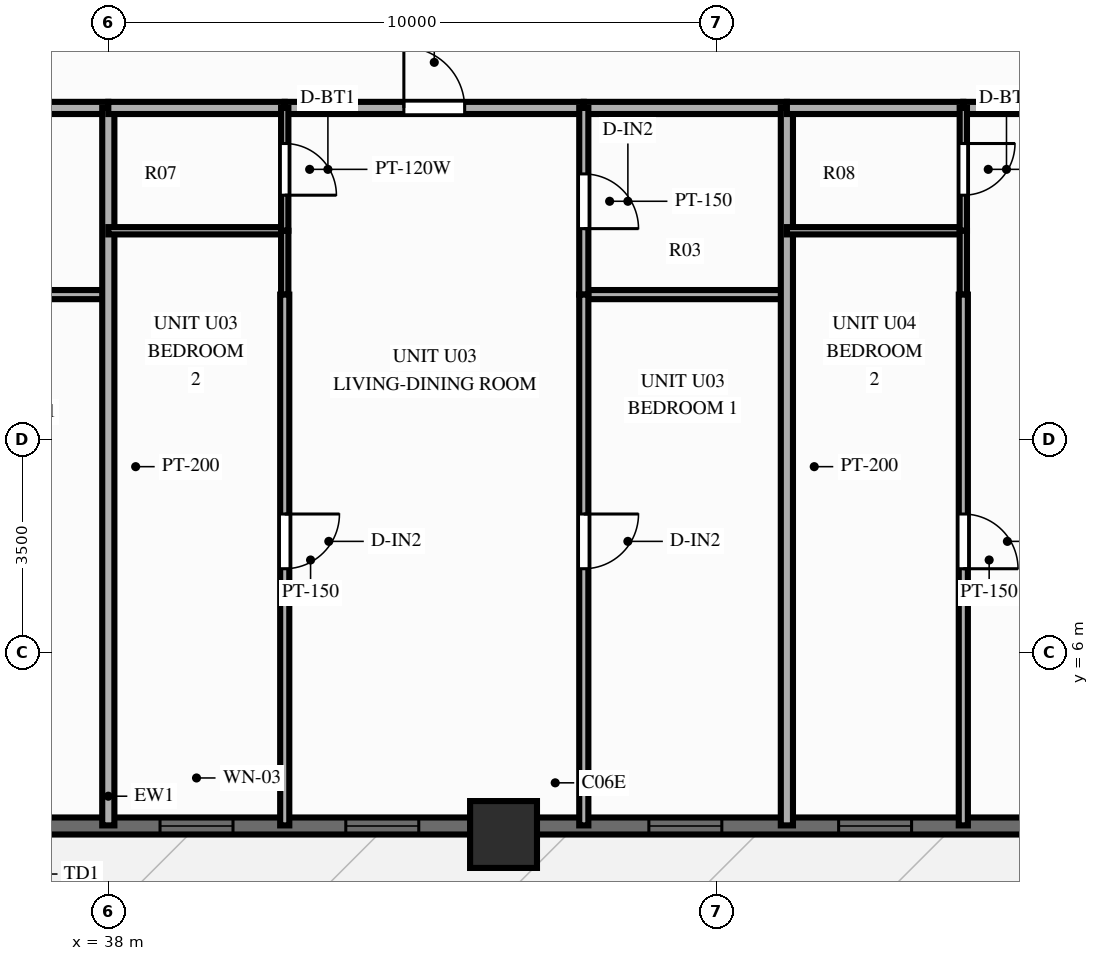
"""IFC4 building model, lengths in metres.
Left out: names, types, materials, properties, quantities, classifications, styles, units other than length and angle.
Written with IfcOpenShell. Run it as: python <this file> out.ifc"""

import sys

from ifc_helpers import new_model, si_unit, direction, frame, frame_2d, origin, origin_2d, place, context, subcontext, project, spatial, rectangle, extrude, source, transform, mapped, element, fill, save


model = new_model("IFC4")
c1 = context("Model", 3, precision=1e-05, world=origin(), true_north=direction((0.0, 1.0)))
c2 = subcontext(c1, "Body", "Model", "MODEL_VIEW")
j1 = project(units=[si_unit("LENGTHUNIT", "METRE"), si_unit("PLANEANGLEUNIT", "RADIAN")], contexts=[c1])
p1 = place(None, origin())
s1 = spatial("IfcSite", under=j1, at=p1, CompositionType="ELEMENT")
p2 = place(p1, origin())
s2 = spatial("IfcBuilding", under=s1, at=p2, CompositionType="ELEMENT")
p3 = place(p2, frame((0.0, 0.0, 43.4)))
s3 = spatial("IfcBuildingStorey", under=s2, at=p3, CompositionType="ELEMENT", Elevation=43.4)
m1 = source(origin(), c2, "Body", "SweptSolid", [
    extrude(rectangle(XDim=1.1, YDim=1.1, at=origin_2d()), origin(), (0.0, 0.0, 1.0), 3.0),
])
p4 = place(p3, frame((44.5, 3.0, 0.0), z_axis=(0.0, 0.0, 1.0), x_axis=(1.0, 0.0, 0.0)))
e1 = element("IfcColumn", 1, at=p4, inside=s3, PredefinedType="COLUMN", context=c2, shape_type="MappedRepresentation", body=[
    mapped(m1, transform((0.0, 0.0, 0.0), scale=1.0)),
])
p5 = place(p3, frame((15.5, 3.14, 0.0), z_axis=(0.0, 0.0, 1.0), x_axis=(1.0, 0.0, 0.0)))
e2 = element("IfcWall", 2, at=p5, inside=s3, PredefinedType="SOLIDWALL", context=c2, shape_type="SweptSolid", body=[
    extrude(rectangle(XDim=45.0, YDim=0.28, at=frame_2d((22.5, 0.0))), origin(), (0.0, 0.0, 1.0), 2.28),
])
p6 = place(p5, frame((1.136, 0.0, 0.25)))
e3 = element("IfcOpeningElement", 3, at=p6, cuts=e2, PredefinedType="OPENING", context=c2, shape_type="SweptSolid", body=[
    extrude(rectangle(XDim=1.2, YDim=1.5, at=frame_2d((0.6, 0.75))), frame((0.0, 0.152, 0.0), z_axis=(0.0, -1.0, 0.0), x_axis=(1.0, 0.0, 0.0)), (0.0, 0.0, 1.0), 0.304),
])
p7 = place(p5, frame((4.825, 0.0, 0.25)))
e4 = element("IfcOpeningElement", 4, at=p7, cuts=e2, PredefinedType="OPENING", context=c2, shape_type="SweptSolid", body=[
    extrude(rectangle(XDim=1.2, YDim=1.5, at=frame_2d((0.6, 0.75))), frame((0.0, 0.152, 0.0), z_axis=(0.0, -1.0, 0.0), x_axis=(1.0, 0.0, 0.0)), (0.0, 0.0, 1.0), 0.304),
])
p8 = place(p5, frame((8.954, 0.0, 0.25)))
e5 = element("IfcOpeningElement", 5, at=p8, cuts=e2, PredefinedType="OPENING", context=c2, shape_type="SweptSolid", body=[
    extrude(rectangle(XDim=1.2, YDim=1.5, at=frame_2d((0.6, 0.75))), frame((0.0, 0.152, 0.0), z_axis=(0.0, -1.0, 0.0), x_axis=(1.0, 0.0, 0.0)), (0.0, 0.0, 1.0), 0.304),
])
p9 = place(p5, frame((12.191, 0.0, 0.25)))
e6 = element("IfcOpeningElement", 6, at=p9, cuts=e2, PredefinedType="OPENING", context=c2, shape_type="SweptSolid", body=[
    extrude(rectangle(XDim=1.2, YDim=1.5, at=frame_2d((0.6, 0.75))), frame((0.0, 0.152, 0.0), z_axis=(0.0, -1.0, 0.0), x_axis=(1.0, 0.0, 0.0)), (0.0, 0.0, 1.0), 0.304),
])
p10 = place(p5, frame((14.576, 0.0, 0.25)))
e7 = element("IfcOpeningElement", 7, at=p10, cuts=e2, PredefinedType="OPENING", context=c2, shape_type="SweptSolid", body=[
    extrude(rectangle(XDim=0.7, YDim=1.5, at=frame_2d((0.35, 0.75))), frame((0.0, 0.152, 0.0), z_axis=(0.0, -1.0, 0.0), x_axis=(1.0, 0.0, 0.0)), (0.0, 0.0, 1.0), 0.304),
])
p11 = place(p5, frame((17.059, 0.0, 0.25)))
e8 = element("IfcOpeningElement", 8, at=p11, cuts=e2, PredefinedType="OPENING", context=c2, shape_type="SweptSolid", body=[
    extrude(rectangle(XDim=1.2, YDim=1.5, at=frame_2d((0.6, 0.75))), frame((0.0, 0.152, 0.0), z_axis=(0.0, -1.0, 0.0), x_axis=(1.0, 0.0, 0.0)), (0.0, 0.0, 1.0), 0.304),
])
p12 = place(p5, frame((21.264, 0.0, 0.0), z_axis=(0.0, 0.0, 1.0), x_axis=(-1.0, 0.0, 0.0)))
e9 = element("IfcOpeningElement", 9, at=p12, cuts=e2, PredefinedType="OPENING", context=c2, shape_type="SweptSolid", body=[
    extrude(rectangle(XDim=1.1, YDim=2.15, at=frame_2d((0.55, 1.075))), frame((0.0, 0.152, 0.0), z_axis=(0.0, -1.0, 0.0), x_axis=(1.0, 0.0, 0.0)), (0.0, 0.0, 1.0), 0.304),
])
p13 = place(p5, frame((23.351, 0.0, 0.25)))
e10 = element("IfcOpeningElement", 10, at=p13, cuts=e2, PredefinedType="OPENING", context=c2, shape_type="SweptSolid", body=[
    extrude(rectangle(XDim=1.2, YDim=1.5, at=frame_2d((0.6, 0.75))), frame((0.0, 0.152, 0.0), z_axis=(0.0, -1.0, 0.0), x_axis=(1.0, 0.0, 0.0)), (0.0, 0.0, 1.0), 0.304),
])
p14 = place(p5, frame((26.406, 0.0, 0.25)))
e11 = element("IfcOpeningElement", 11, at=p14, cuts=e2, PredefinedType="OPENING", context=c2, shape_type="SweptSolid", body=[
    extrude(rectangle(XDim=1.2, YDim=1.5, at=frame_2d((0.6, 0.75))), frame((0.0, 0.152, 0.0), z_axis=(0.0, -1.0, 0.0), x_axis=(1.0, 0.0, 0.0)), (0.0, 0.0, 1.0), 0.304),
])
p15 = place(p5, frame((31.39, 0.0, 0.25)))
e12 = element("IfcOpeningElement", 12, at=p15, cuts=e2, PredefinedType="OPENING", context=c2, shape_type="SweptSolid", body=[
    extrude(rectangle(XDim=1.2, YDim=1.5, at=frame_2d((0.6, 0.75))), frame((0.0, 0.152, 0.0), z_axis=(0.0, -1.0, 0.0), x_axis=(1.0, 0.0, 0.0)), (0.0, 0.0, 1.0), 0.304),
])
p16 = place(p5, frame((34.511, 0.0, 0.25)))
e13 = element("IfcOpeningElement", 13, at=p16, cuts=e2, PredefinedType="OPENING", context=c2, shape_type="SweptSolid", body=[
    extrude(rectangle(XDim=1.2, YDim=1.5, at=frame_2d((0.6, 0.75))), frame((0.0, 0.152, 0.0), z_axis=(0.0, -1.0, 0.0), x_axis=(1.0, 0.0, 0.0)), (0.0, 0.0, 1.0), 0.304),
])
p17 = place(p5, frame((38.305, 0.0, 0.25)))
e14 = element("IfcOpeningElement", 14, at=p17, cuts=e2, PredefinedType="OPENING", context=c2, shape_type="SweptSolid", body=[
    extrude(rectangle(XDim=1.2, YDim=1.5, at=frame_2d((0.6, 0.75))), frame((0.0, 0.152, 0.0), z_axis=(0.0, -1.0, 0.0), x_axis=(1.0, 0.0, 0.0)), (0.0, 0.0, 1.0), 0.304),
])
p18 = place(p5, frame((42.329, 0.0, 0.25)))
e15 = element("IfcOpeningElement", 15, at=p18, cuts=e2, PredefinedType="OPENING", context=c2, shape_type="SweptSolid", body=[
    extrude(rectangle(XDim=1.2, YDim=1.5, at=frame_2d((0.6, 0.75))), frame((0.0, 0.152, 0.0), z_axis=(0.0, -1.0, 0.0), x_axis=(1.0, 0.0, 0.0)), (0.0, 0.0, 1.0), 0.304),
])
p19 = place(p3, frame((34.429, 14.95, 0.0), z_axis=(0.0, 0.0, 1.0), x_axis=(1.0, 0.0, 0.0)))
e16 = element("IfcWall", 16, at=p19, inside=s3, PredefinedType="PARTITIONING", context=c2, shape_type="SweptSolid", body=[
    extrude(rectangle(XDim=3.571, YDim=0.2, at=frame_2d((1.786, 0.0))), origin(), (0.0, 0.0, 1.0), 2.79),
])
p20 = place(p3, frame((34.429, 11.88, 0.0), z_axis=(0.0, 0.0, 1.0), x_axis=(1.0, 0.0, 0.0)))
e17 = element("IfcWall", 17, at=p20, inside=s3, PredefinedType="PARTITIONING", context=c2, shape_type="SweptSolid", body=[
    extrude(rectangle(XDim=3.571, YDim=0.15, at=frame_2d((1.786, 0.0))), origin(), (0.0, 0.0, 1.0), 2.79),
])
p21 = place(p3, frame((38.0, 14.95, 0.0), z_axis=(0.0, 0.0, 1.0), x_axis=(0.0, -1.0, 0.0)))
e18 = element("IfcWall", 18, at=p21, inside=s3, PredefinedType="PARTITIONING", context=c2, shape_type="SweptSolid", body=[
    extrude(rectangle(XDim=11.8, YDim=0.2, at=frame_2d((5.9, 0.0))), origin(), (0.0, 0.0, 1.0), 2.79),
])
p22 = place(p3, frame((38.0, 14.95, 0.0), z_axis=(0.0, 0.0, 1.0), x_axis=(1.0, 0.0, 0.0)))
e19 = element("IfcWall", 19, at=p22, inside=s3, PredefinedType="PARTITIONING", context=c2, shape_type="SweptSolid", body=[
    extrude(rectangle(XDim=2.902, YDim=0.2, at=frame_2d((1.451, 0.0))), origin(), (0.0, 0.0, 1.0), 2.79),
])
p23 = place(p3, frame((40.902, 14.95, 0.0), z_axis=(0.0, 0.0, 1.0), x_axis=(1.0, 0.0, 0.0)))
e20 = element("IfcWall", 20, at=p23, inside=s3, PredefinedType="PARTITIONING", context=c2, shape_type="SweptSolid", body=[
    extrude(rectangle(XDim=4.918, YDim=0.2, at=frame_2d((2.459, 0.0))), origin(), (0.0, 0.0, 1.0), 2.79),
])
p24 = place(p23, frame((1.959, 0.0, 0.0)))
e21 = element("IfcOpeningElement", 21, at=p24, cuts=e20, PredefinedType="OPENING", context=c2, shape_type="SweptSolid", body=[
    extrude(rectangle(XDim=1.0, YDim=2.15, at=frame_2d((0.5, 1.075))), frame((0.0, 0.112, 0.0), z_axis=(0.0, -1.0, 0.0), x_axis=(1.0, 0.0, 0.0)), (0.0, 0.0, 1.0), 0.224),
])
p25 = place(p3, frame((45.82, 14.95, 0.0), z_axis=(0.0, 0.0, 1.0), x_axis=(1.0, 0.0, 0.0)))
e22 = element("IfcWall", 22, at=p25, inside=s3, PredefinedType="PARTITIONING", context=c2, shape_type="SweptSolid", body=[
    extrude(rectangle(XDim=3.34, YDim=0.2, at=frame_2d((1.67, 0.0))), origin(), (0.0, 0.0, 1.0), 2.79),
])
p26 = place(p3, frame((38.0, 12.93, 0.0), z_axis=(0.0, 0.0, 1.0), x_axis=(1.0, 0.0, 0.0)))
e23 = element("IfcWall", 23, at=p26, inside=s3, PredefinedType="PARTITIONING", context=c2, shape_type="SweptSolid", body=[
    extrude(rectangle(XDim=2.902, YDim=0.12, at=frame_2d((1.451, 0.0))), origin(), (0.0, 0.0, 1.0), 2.79),
])
p27 = place(p3, frame((45.82, 11.88, 0.0), z_axis=(0.0, 0.0, 1.0), x_axis=(1.0, 0.0, 0.0)))
e24 = element("IfcWall", 24, at=p27, inside=s3, PredefinedType="PARTITIONING", context=c2, shape_type="SweptSolid", body=[
    extrude(rectangle(XDim=3.34, YDim=0.15, at=frame_2d((1.67, 0.0))), origin(), (0.0, 0.0, 1.0), 2.79),
])
p28 = place(p3, frame((40.902, 14.95, 0.0), z_axis=(0.0, 0.0, 1.0), x_axis=(0.0, -1.0, 0.0)))
e25 = element("IfcWall", 25, at=p28, inside=s3, PredefinedType="PARTITIONING", context=c2, shape_type="SweptSolid", body=[
    extrude(rectangle(XDim=2.02, YDim=0.12, at=frame_2d((1.01, 0.0))), origin(), (0.0, 0.0, 1.0), 2.79),
])
p29 = place(p28, frame((0.585, 0.0, 0.0)))
e26 = element("IfcOpeningElement", 26, at=p29, cuts=e25, PredefinedType="OPENING", context=c2, shape_type="SweptSolid", body=[
    extrude(rectangle(XDim=0.85, YDim=2.05, at=frame_2d((0.425, 1.025))), frame((0.0, 0.072, 0.0), z_axis=(0.0, -1.0, 0.0), x_axis=(1.0, 0.0, 0.0)), (0.0, 0.0, 1.0), 0.144),
])
p30 = place(p3, frame((40.902, 12.93, 0.0), z_axis=(0.0, 0.0, 1.0), x_axis=(0.0, -1.0, 0.0)))
e27 = element("IfcWall", 27, at=p30, inside=s3, PredefinedType="PARTITIONING", context=c2, shape_type="SweptSolid", body=[
    extrude(rectangle(XDim=1.05, YDim=0.12, at=frame_2d((0.525, 0.0))), origin(), (0.0, 0.0, 1.0), 2.79),
])
p31 = place(p3, frame((40.902, 11.88, 0.0), z_axis=(0.0, 0.0, 1.0), x_axis=(0.0, -1.0, 0.0)))
e28 = element("IfcWall", 28, at=p31, inside=s3, PredefinedType="PARTITIONING", context=c2, shape_type="SweptSolid", body=[
    extrude(rectangle(XDim=8.73, YDim=0.15, at=frame_2d((4.365, 0.0))), origin(), (0.0, 0.0, 1.0), 2.79),
])
p32 = place(p31, frame((3.609, 0.0, 0.0)))
e29 = element("IfcOpeningElement", 29, at=p32, cuts=e28, PredefinedType="OPENING", context=c2, shape_type="SweptSolid", body=[
    extrude(rectangle(XDim=0.9, YDim=2.1, at=frame_2d((0.45, 1.05))), frame((0.0, 0.087, 0.0), z_axis=(0.0, -1.0, 0.0), x_axis=(1.0, 0.0, 0.0)), (0.0, 0.0, 1.0), 0.174),
])
p33 = place(p3, frame((45.82, 14.95, 0.0), z_axis=(0.0, 0.0, 1.0), x_axis=(0.0, -1.0, 0.0)))
e30 = element("IfcWall", 30, at=p33, inside=s3, PredefinedType="PARTITIONING", context=c2, shape_type="SweptSolid", body=[
    extrude(rectangle(XDim=3.07, YDim=0.15, at=frame_2d((1.535, 0.0))), origin(), (0.0, 0.0, 1.0), 2.79),
])
p34 = place(p33, frame((1.085, 0.0, 0.0)))
e31 = element("IfcOpeningElement", 31, at=p34, cuts=e30, PredefinedType="OPENING", context=c2, shape_type="SweptSolid", body=[
    extrude(rectangle(XDim=0.9, YDim=2.1, at=frame_2d((0.45, 1.05))), frame((0.0, 0.087, 0.0), z_axis=(0.0, -1.0, 0.0), x_axis=(1.0, 0.0, 0.0)), (0.0, 0.0, 1.0), 0.174),
])
p35 = place(p3, frame((45.82, 11.88, 0.0), z_axis=(0.0, 0.0, 1.0), x_axis=(0.0, -1.0, 0.0)))
e32 = element("IfcWall", 32, at=p35, inside=s3, PredefinedType="PARTITIONING", context=c2, shape_type="SweptSolid", body=[
    extrude(rectangle(XDim=8.73, YDim=0.15, at=frame_2d((4.365, 0.0))), origin(), (0.0, 0.0, 1.0), 2.79),
])
p36 = place(p35, frame((3.609, 0.0, 0.0)))
e33 = element("IfcOpeningElement", 33, at=p36, cuts=e32, PredefinedType="OPENING", context=c2, shape_type="SweptSolid", body=[
    extrude(rectangle(XDim=0.9, YDim=2.1, at=frame_2d((0.45, 1.05))), frame((0.0, 0.087, 0.0), z_axis=(0.0, -1.0, 0.0), x_axis=(1.0, 0.0, 0.0)), (0.0, 0.0, 1.0), 0.174),
])
p37 = place(p3, frame((49.16, 14.95, 0.0), z_axis=(0.0, 0.0, 1.0), x_axis=(0.0, -1.0, 0.0)))
e34 = element("IfcWall", 34, at=p37, inside=s3, PredefinedType="PARTITIONING", context=c2, shape_type="SweptSolid", body=[
    extrude(rectangle(XDim=11.8, YDim=0.2, at=frame_2d((5.9, 0.0))), origin(), (0.0, 0.0, 1.0), 2.79),
])
p38 = place(p3, frame((49.16, 14.95, 0.0), z_axis=(0.0, 0.0, 1.0), x_axis=(1.0, 0.0, 0.0)))
e35 = element("IfcWall", 35, at=p38, inside=s3, PredefinedType="PARTITIONING", context=c2, shape_type="SweptSolid", body=[
    extrude(rectangle(XDim=2.902, YDim=0.2, at=frame_2d((1.451, 0.0))), origin(), (0.0, 0.0, 1.0), 2.79),
])
p39 = place(p3, frame((52.062, 14.95, 0.0), z_axis=(0.0, 0.0, 1.0), x_axis=(1.0, 0.0, 0.0)))
e36 = element("IfcWall", 36, at=p39, inside=s3, PredefinedType="PARTITIONING", context=c2, shape_type="SweptSolid", body=[
    extrude(rectangle(XDim=4.687, YDim=0.2, at=frame_2d((2.344, 0.0))), origin(), (0.0, 0.0, 1.0), 2.79),
])
p40 = place(p39, frame((1.844, 0.0, 0.0)))
e37 = element("IfcOpeningElement", 37, at=p40, cuts=e36, PredefinedType="OPENING", context=c2, shape_type="SweptSolid", body=[
    extrude(rectangle(XDim=1.0, YDim=2.15, at=frame_2d((0.5, 1.075))), frame((0.0, 0.112, 0.0), z_axis=(0.0, -1.0, 0.0), x_axis=(1.0, 0.0, 0.0)), (0.0, 0.0, 1.0), 0.224),
])
p41 = place(p3, frame((49.16, 12.93, 0.0), z_axis=(0.0, 0.0, 1.0), x_axis=(1.0, 0.0, 0.0)))
e38 = element("IfcWall", 38, at=p41, inside=s3, PredefinedType="PARTITIONING", context=c2, shape_type="SweptSolid", body=[
    extrude(rectangle(XDim=2.902, YDim=0.12, at=frame_2d((1.451, 0.0))), origin(), (0.0, 0.0, 1.0), 2.79),
])
p42 = place(p3, frame((52.062, 14.95, 0.0), z_axis=(0.0, 0.0, 1.0), x_axis=(0.0, -1.0, 0.0)))
e39 = element("IfcWall", 39, at=p42, inside=s3, PredefinedType="PARTITIONING", context=c2, shape_type="SweptSolid", body=[
    extrude(rectangle(XDim=2.02, YDim=0.12, at=frame_2d((1.01, 0.0))), origin(), (0.0, 0.0, 1.0), 2.79),
])
p43 = place(p42, frame((0.585, 0.0, 0.0)))
e40 = element("IfcOpeningElement", 40, at=p43, cuts=e39, PredefinedType="OPENING", context=c2, shape_type="SweptSolid", body=[
    extrude(rectangle(XDim=0.85, YDim=2.05, at=frame_2d((0.425, 1.025))), frame((0.0, 0.072, 0.0), z_axis=(0.0, -1.0, 0.0), x_axis=(1.0, 0.0, 0.0)), (0.0, 0.0, 1.0), 0.144),
])
p44 = place(p3, frame((52.062, 12.93, 0.0), z_axis=(0.0, 0.0, 1.0), x_axis=(0.0, -1.0, 0.0)))
e41 = element("IfcWall", 41, at=p44, inside=s3, PredefinedType="PARTITIONING", context=c2, shape_type="SweptSolid", body=[
    extrude(rectangle(XDim=1.05, YDim=0.12, at=frame_2d((0.525, 0.0))), origin(), (0.0, 0.0, 1.0), 2.79),
])
p45 = place(p3, frame((52.062, 11.88, 0.0), z_axis=(0.0, 0.0, 1.0), x_axis=(0.0, -1.0, 0.0)))
e42 = element("IfcWall", 42, at=p45, inside=s3, PredefinedType="PARTITIONING", context=c2, shape_type="SweptSolid", body=[
    extrude(rectangle(XDim=8.73, YDim=0.15, at=frame_2d((4.365, 0.0))), origin(), (0.0, 0.0, 1.0), 2.79),
])
p46 = place(p45, frame((3.609, 0.0, 0.0)))
e43 = element("IfcOpeningElement", 43, at=p46, cuts=e42, PredefinedType="OPENING", context=c2, shape_type="SweptSolid", body=[
    extrude(rectangle(XDim=0.9, YDim=2.1, at=frame_2d((0.45, 1.05))), frame((0.0, 0.087, 0.0), z_axis=(0.0, -1.0, 0.0), x_axis=(1.0, 0.0, 0.0)), (0.0, 0.0, 1.0), 0.174),
])
m2 = source(origin(), c2, "Body", "SweptSolid", [
    extrude(rectangle(XDim=1.2, YDim=1.5, at=frame_2d((0.6, 0.75))), frame((0.0, 0.03, 0.0), z_axis=(0.0, -1.0, 0.0), x_axis=(1.0, 0.0, 0.0)), (0.0, 0.0, 1.0), 0.06),
])
p47 = place(p13, origin())
e44 = element("IfcWindow", 44, at=p47, inside=s3, PartitioningType="SINGLE_PANEL", PredefinedType="WINDOW", context=c2, shape_type="MappedRepresentation", body=[
    mapped(m2, transform((0.0, 0.0, 0.0), scale=1.0)),
])
fill(e10, e44)
p48 = place(p14, origin())
e45 = element("IfcWindow", 45, at=p48, inside=s3, PartitioningType="SINGLE_PANEL", PredefinedType="WINDOW", context=c2, shape_type="MappedRepresentation", body=[
    mapped(m2, transform((0.0, 0.0, 0.0), scale=1.0)),
])
fill(e11, e45)
p49 = place(p15, origin())
e46 = element("IfcWindow", 46, at=p49, inside=s3, PartitioningType="SINGLE_PANEL", PredefinedType="WINDOW", context=c2, shape_type="MappedRepresentation", body=[
    mapped(m2, transform((0.0, 0.0, 0.0), scale=1.0)),
])
fill(e12, e46)
p50 = place(p16, origin())
e47 = element("IfcWindow", 47, at=p50, inside=s3, PartitioningType="SINGLE_PANEL", PredefinedType="WINDOW", context=c2, shape_type="MappedRepresentation", body=[
    mapped(m2, transform((0.0, 0.0, 0.0), scale=1.0)),
])
fill(e13, e47)
m3 = source(origin(), c2, "Body", "SweptSolid", [
    extrude(rectangle(XDim=1.0, YDim=2.15, at=frame_2d((0.5, 1.075))), frame((0.0, 0.025, 0.0), z_axis=(0.0, -1.0, 0.0), x_axis=(1.0, 0.0, 0.0)), (0.0, 0.0, 1.0), 0.05),
])
p51 = place(p24, origin())
e48 = element("IfcDoor", 48, at=p51, inside=s3, OperationType="SINGLE_SWING_LEFT", PredefinedType="DOOR", context=c2, shape_type="MappedRepresentation", body=[
    mapped(m3, transform((0.0, 0.0, 0.0), scale=1.0)),
])
fill(e21, e48)
m4 = source(origin(), c2, "Body", "SweptSolid", [
    extrude(rectangle(XDim=0.85, YDim=2.05, at=frame_2d((0.425, 1.025))), frame((0.0, 0.025, 0.0), z_axis=(0.0, -1.0, 0.0), x_axis=(1.0, 0.0, 0.0)), (0.0, 0.0, 1.0), 0.05),
])
p52 = place(p29, origin())
e49 = element("IfcDoor", 49, at=p52, inside=s3, OperationType="SINGLE_SWING_RIGHT", PredefinedType="DOOR", context=c2, shape_type="MappedRepresentation", body=[
    mapped(m4, transform((0.0, 0.0, 0.0), scale=1.0)),
])
fill(e26, e49)
m5 = source(origin(), c2, "Body", "SweptSolid", [
    extrude(rectangle(XDim=0.9, YDim=2.1, at=frame_2d((0.45, 1.05))), frame((0.0, 0.025, 0.0), z_axis=(0.0, -1.0, 0.0), x_axis=(1.0, 0.0, 0.0)), (0.0, 0.0, 1.0), 0.05),
])
p53 = place(p32, origin())
e50 = element("IfcDoor", 50, at=p53, inside=s3, OperationType="SINGLE_SWING_LEFT", PredefinedType="DOOR", context=c2, shape_type="MappedRepresentation", body=[
    mapped(m5, transform((0.0, 0.0, 0.0), scale=1.0)),
])
fill(e29, e50)
p54 = place(p34, origin())
e51 = element("IfcDoor", 51, at=p54, inside=s3, OperationType="SINGLE_SWING_RIGHT", PredefinedType="DOOR", context=c2, shape_type="MappedRepresentation", body=[
    mapped(m5, transform((0.0, 0.0, 0.0), scale=1.0)),
])
fill(e31, e51)
p55 = place(p36, origin())
e52 = element("IfcDoor", 52, at=p55, inside=s3, OperationType="SINGLE_SWING_LEFT", PredefinedType="DOOR", context=c2, shape_type="MappedRepresentation", body=[
    mapped(m5, transform((0.0, 0.0, 0.0), scale=1.0)),
])
fill(e33, e52)
p56 = place(p43, origin())
e53 = element("IfcDoor", 53, at=p56, inside=s3, OperationType="SINGLE_SWING_LEFT", PredefinedType="DOOR", context=c2, shape_type="MappedRepresentation", body=[
    mapped(m4, transform((0.0, 0.0, 0.0), scale=1.0)),
])
fill(e40, e53)
p57 = place(p46, origin())
e54 = element("IfcDoor", 54, at=p57, inside=s3, OperationType="SINGLE_SWING_RIGHT", PredefinedType="DOOR", context=c2, shape_type="MappedRepresentation", body=[
    mapped(m5, transform((0.0, 0.0, 0.0), scale=1.0)),
])
fill(e43, e54)
save(model, sys.argv[1])
